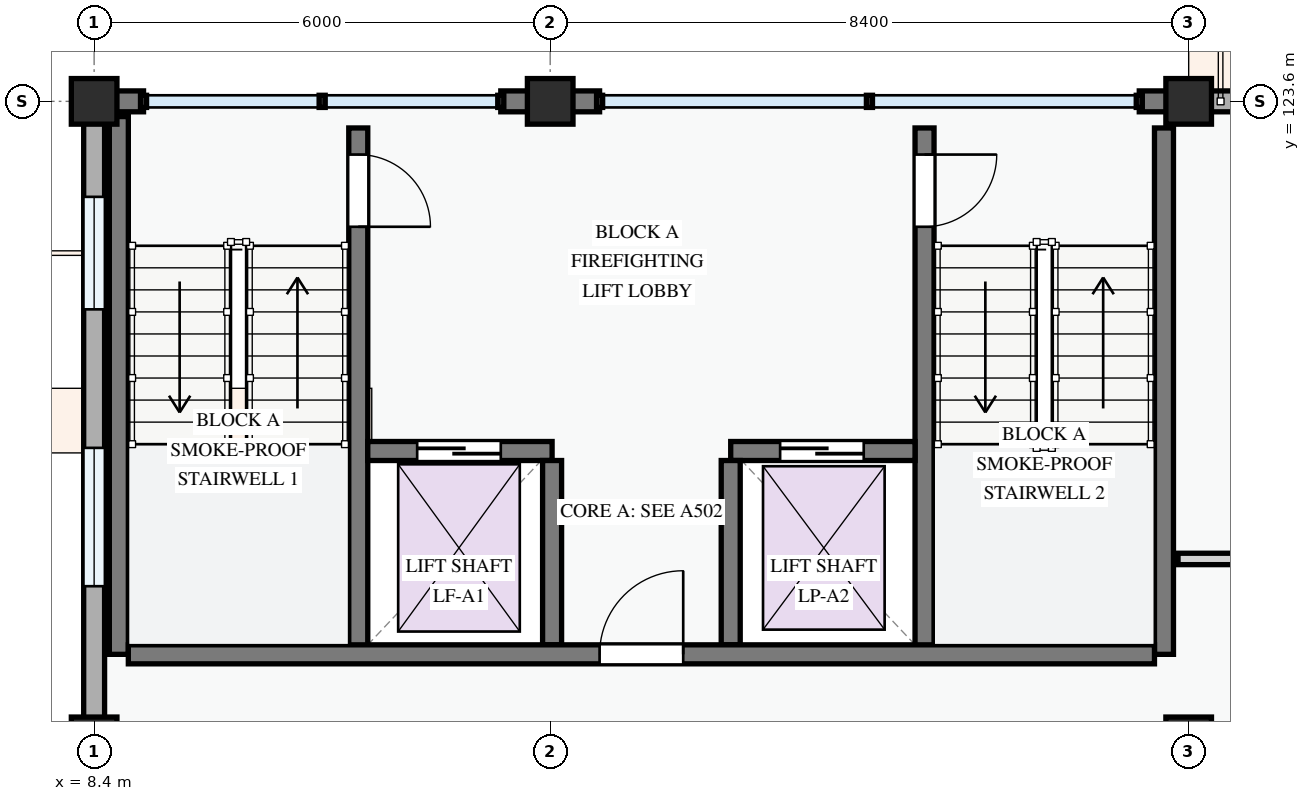
"""IFC4 building model, lengths in metres.
Left out: names, types, materials, properties, quantities, classifications, styles, units other than length and angle.
Written with IfcOpenShell. Run it as: python <this file> out.ifc"""

import sys

from ifc_helpers import new_model, si_unit, direction, frame, frame_2d, origin, origin_2d, place, context, subcontext, project, spatial, rectangle, extrude, element, fill, save


model = new_model("IFC4")
c1 = context("Model", 3, precision=1e-05, world=origin(), true_north=direction((0.0, 1.0)))
c2 = subcontext(c1, "Body", "Model", "MODEL_VIEW")
j1 = project(units=[si_unit("LENGTHUNIT", "METRE"), si_unit("PLANEANGLEUNIT", "RADIAN")], contexts=[c1])
p1 = place(None, origin())
s1 = spatial("IfcSite", under=j1, at=p1, CompositionType="ELEMENT")
p2 = place(p1, origin())
s2 = spatial("IfcBuilding", under=s1, at=p2, CompositionType="ELEMENT")
p3 = place(p2, frame((0.0, 0.0, 31.2)))
s3 = spatial("IfcBuildingStorey", under=s2, at=p3, CompositionType="ELEMENT", Elevation=31.2)
for number, where, z_axis, x_axis in (
    (1, (8.4, 115.2, 0.0), (0.0, 0.0, 1.0), (1.0, 0.0, 0.0)),
    (2, (8.4, 123.6, 0.0), (0.0, 0.0, 1.0), (1.0, 0.0, 0.0)),
    (3, (14.4, 123.6, 0.0), (0.0, 0.0, 1.0), (1.0, 0.0, 0.0)),
    (4, (22.8, 115.2, 0.0), (0.0, 0.0, 1.0), (1.0, 0.0, 0.0)),
    (5, (22.8, 123.6, 0.0), (0.0, 0.0, 1.0), (1.0, 0.0, 0.0)),
):
    element("IfcColumn", number, at=place(p3, frame(where, z_axis=z_axis, x_axis=x_axis)), inside=s3, PredefinedType="COLUMN", context=c2, shape_type="SweptSolid", body=[
        extrude(rectangle(XDim=0.6, YDim=0.6, at=origin_2d()), origin(), (0.0, 0.0, 1.0), 3.3),
    ])
p4 = place(p3, frame((28.8, 123.6, 0.0), z_axis=(0.0, 0.0, 1.0), x_axis=(-1.0, 0.0, 0.0)))
e6 = element("IfcWall", 6, at=p4, inside=s3, PredefinedType="STANDARD", context=c2, shape_type="SweptSolid", body=[
    extrude(rectangle(XDim=6.0, YDim=0.275, at=frame_2d((3.0, 0.0))), origin(), (0.0, 0.0, 1.0), 2.525),
])
p5 = place(p4, frame((0.62, 0.0, 0.0)))
e7 = element("IfcOpeningElement", 7, at=p5, cuts=e6, PredefinedType="OPENING", context=c2, shape_type="SweptSolid", body=[
    extrude(rectangle(XDim=1.5, YDim=2.2, at=frame_2d((0.75, 1.1))), frame((0.0, 0.147, 0.0), z_axis=(0.0, -1.0, 0.0), x_axis=(1.0, 0.0, 0.0)), (0.0, 0.0, 1.0), 0.295),
])
p6 = place(p4, frame((3.415, 0.0, 0.78)))
e8 = element("IfcOpeningElement", 8, at=p6, cuts=e6, PredefinedType="OPENING", context=c2, shape_type="SweptSolid", body=[
    extrude(rectangle(XDim=1.15, YDim=1.25, at=frame_2d((0.575, 0.625))), frame((0.0, 0.147, 0.0), z_axis=(0.0, -1.0, 0.0), x_axis=(1.0, 0.0, 0.0)), (0.0, 0.0, 1.0), 0.295),
])
for number, where, z_axis, x_axis in (
    (9, (22.8, 123.6, 0.0), (0.0, 0.0, 1.0), (-1.0, 0.0, 0.0)),
    (10, (15.05, 123.6, 0.0), (0.0, 0.0, 1.0), (-1.0, 0.0, 0.0)),
):
    element("IfcWall", number, at=place(p3, frame(where, z_axis=z_axis, x_axis=x_axis)), inside=s3, PredefinedType="STANDARD", context=c2, shape_type="SweptSolid", body=[
        extrude(rectangle(XDim=0.65, YDim=0.275, at=frame_2d((0.325, 0.0))), origin(), (0.0, 0.0, 1.0), 3.04),
    ])
p7 = place(p3, frame((14.4, 123.6, 0.0), z_axis=(0.0, 0.0, 1.0), x_axis=(-1.0, 0.0, 0.0)))
e11 = element("IfcWall", 11, at=p7, inside=s3, PredefinedType="STANDARD", context=c2, shape_type="SweptSolid", body=[
    extrude(rectangle(XDim=0.65, YDim=0.275, at=frame_2d((0.325, 0.0))), origin(), (0.0, 0.0, 1.0), 3.04),
])
p8 = place(p3, frame((9.05, 123.6, 0.0), z_axis=(0.0, 0.0, 1.0), x_axis=(-1.0, 0.0, 0.0)))
e12 = element("IfcWall", 12, at=p8, inside=s3, PredefinedType="STANDARD", context=c2, shape_type="SweptSolid", body=[
    extrude(rectangle(XDim=0.51, YDim=0.275, at=frame_2d((0.255, 0.0))), origin(), (0.0, 0.0, 1.0), 3.04),
])
p9 = place(p3, frame((8.4, 123.6, 0.0), z_axis=(0.0, 0.0, 1.0), x_axis=(0.0, -1.0, 0.0)))
e13 = element("IfcWall", 13, at=p9, inside=s3, PredefinedType="STANDARD", context=c2, shape_type="SweptSolid", body=[
    extrude(rectangle(XDim=8.4, YDim=0.275, at=frame_2d((4.2, 0.0))), origin(), (0.0, 0.0, 1.0), 2.425),
])
p10 = place(p9, frame((1.256, 0.0, 0.78)))
e14 = element("IfcOpeningElement", 14, at=p10, cuts=e13, PredefinedType="OPENING", context=c2, shape_type="SweptSolid", body=[
    extrude(rectangle(XDim=1.48, YDim=1.52, at=frame_2d((0.74, 0.76))), frame((0.0, 0.147, 0.0), z_axis=(0.0, -1.0, 0.0), x_axis=(1.0, 0.0, 0.0)), (0.0, 0.0, 1.0), 0.295),
])
p11 = place(p9, frame((4.559, 0.0, 0.78)))
e15 = element("IfcOpeningElement", 15, at=p11, cuts=e13, PredefinedType="OPENING", context=c2, shape_type="SweptSolid", body=[
    extrude(rectangle(XDim=1.82, YDim=1.46, at=frame_2d((0.91, 0.73))), frame((0.0, 0.147, 0.0), z_axis=(0.0, -1.0, 0.0), x_axis=(1.0, 0.0, 0.0)), (0.0, 0.0, 1.0), 0.295),
])
p12 = place(p3, frame((11.875, 123.25, 0.0), z_axis=(0.0, 0.0, 1.0), x_axis=(0.0, -1.0, 0.0)))
e16 = element("IfcWall", 16, at=p12, inside=s3, PredefinedType="SHEAR", context=c2, shape_type="SweptSolid", body=[
    extrude(rectangle(XDim=6.925, YDim=0.25, at=frame_2d((3.462, 0.0))), origin(), (0.0, 0.0, 1.0), 3.0),
])
p13 = place(p12, frame((0.35, 0.0, 0.0)))
e17 = element("IfcOpeningElement", 17, at=p13, cuts=e16, PredefinedType="OPENING", context=c2, shape_type="SweptSolid", body=[
    extrude(rectangle(XDim=0.95, YDim=2.1, at=frame_2d((0.475, 1.05))), frame((0.0, 0.135, 0.0), z_axis=(0.0, -1.0, 0.0), x_axis=(1.0, 0.0, 0.0)), (0.0, 0.0, 1.0), 0.27),
])
p14 = place(p3, frame((8.725, 123.4, 0.0), z_axis=(0.0, 0.0, 1.0), x_axis=(0.0, -1.0, 0.0)))
e18 = element("IfcWall", 18, at=p14, inside=s3, PredefinedType="SHEAR", context=c2, shape_type="SweptSolid", body=[
    extrude(rectangle(XDim=7.075, YDim=0.25, at=frame_2d((3.538, 0.0))), origin(), (0.0, 0.0, 1.0), 3.0),
])
p15 = place(p3, frame((22.475, 123.25, 0.0), z_axis=(0.0, 0.0, 1.0), x_axis=(0.0, -1.0, 0.0)))
e19 = element("IfcWall", 19, at=p15, inside=s3, PredefinedType="SHEAR", context=c2, shape_type="SweptSolid", body=[
    extrude(rectangle(XDim=6.925, YDim=0.25, at=frame_2d((3.462, 0.0))), origin(), (0.0, 0.0, 1.0), 3.0),
])
p16 = place(p3, frame((19.325, 123.25, 0.0), z_axis=(0.0, 0.0, 1.0), x_axis=(0.0, -1.0, 0.0)))
e20 = element("IfcWall", 20, at=p16, inside=s3, PredefinedType="SHEAR", context=c2, shape_type="SweptSolid", body=[
    extrude(rectangle(XDim=6.925, YDim=0.25, at=frame_2d((3.462, 0.0))), origin(), (0.0, 0.0, 1.0), 3.0),
])
p17 = place(p16, frame((0.35, 0.0, 0.0)))
e21 = element("IfcOpeningElement", 21, at=p17, cuts=e20, PredefinedType="OPENING", context=c2, shape_type="SweptSolid", body=[
    extrude(rectangle(XDim=0.95, YDim=2.1, at=frame_2d((0.475, 1.05))), frame((0.0, 0.135, 0.0), z_axis=(0.0, -1.0, 0.0), x_axis=(1.0, 0.0, 0.0)), (0.0, 0.0, 1.0), 0.27),
])
p18 = place(p3, frame((12.0, 119.0, 0.0), z_axis=(0.0, 0.0, 1.0), x_axis=(1.0, 0.0, 0.0)))
e22 = element("IfcWall", 22, at=p18, inside=s3, PredefinedType="SHEAR", context=c2, shape_type="SweptSolid", body=[
    extrude(rectangle(XDim=2.425, YDim=0.25, at=frame_2d((1.212, 0.0))), origin(), (0.0, 0.0, 1.0), 3.0),
])
p19 = place(p18, frame((0.65, 0.0, 0.0)))
e23 = element("IfcOpeningElement", 23, at=p19, cuts=e22, PredefinedType="OPENING", context=c2, shape_type="SweptSolid", body=[
    extrude(rectangle(XDim=1.1, YDim=2.15, at=frame_2d((0.55, 1.075))), frame((0.0, 0.135, 0.0), z_axis=(0.0, -1.0, 0.0), x_axis=(1.0, 0.0, 0.0)), (0.0, 0.0, 1.0), 0.27),
])
p20 = place(p3, frame((16.775, 119.0, 0.0), z_axis=(0.0, 0.0, 1.0), x_axis=(1.0, 0.0, 0.0)))
e24 = element("IfcWall", 24, at=p20, inside=s3, PredefinedType="SHEAR", context=c2, shape_type="SweptSolid", body=[
    extrude(rectangle(XDim=2.425, YDim=0.25, at=frame_2d((1.212, 0.0))), origin(), (0.0, 0.0, 1.0), 3.0),
])
p21 = place(p20, frame((0.65, 0.0, 0.0)))
e25 = element("IfcOpeningElement", 25, at=p21, cuts=e24, PredefinedType="OPENING", context=c2, shape_type="SweptSolid", body=[
    extrude(rectangle(XDim=1.1, YDim=2.15, at=frame_2d((0.55, 1.075))), frame((0.0, 0.135, 0.0), z_axis=(0.0, -1.0, 0.0), x_axis=(1.0, 0.0, 0.0)), (0.0, 0.0, 1.0), 0.27),
])
for number, where, z_axis, x_axis in (
    (26, (14.425, 118.875, 0.0), (0.0, 0.0, 1.0), (0.0, -1.0, 0.0)),
    (27, (16.775, 118.875, 0.0), (0.0, 0.0, 1.0), (0.0, -1.0, 0.0)),
):
    element("IfcWall", number, at=place(p3, frame(where, z_axis=z_axis, x_axis=x_axis)), inside=s3, PredefinedType="SHEAR", context=c2, shape_type="SweptSolid", body=[
        extrude(rectangle(XDim=2.425, YDim=0.25, at=frame_2d((1.212, 0.0))), origin(), (0.0, 0.0, 1.0), 3.0),
    ])
p22 = place(p3, frame((8.85, 116.325, 0.0), z_axis=(0.0, 0.0, 1.0), x_axis=(1.0, 0.0, 0.0)))
e28 = element("IfcWall", 28, at=p22, inside=s3, PredefinedType="SHEAR", context=c2, shape_type="SweptSolid", body=[
    extrude(rectangle(XDim=13.5, YDim=0.25, at=frame_2d((6.75, 0.0))), origin(), (0.0, 0.0, 1.0), 3.0),
])
p23 = place(p22, frame((6.2, 0.0, 0.0)))
e29 = element("IfcOpeningElement", 29, at=p23, cuts=e28, PredefinedType="OPENING", context=c2, shape_type="SweptSolid", body=[
    extrude(rectangle(XDim=1.1, YDim=2.15, at=frame_2d((0.55, 1.075))), frame((0.0, 0.135, 0.0), z_axis=(0.0, -1.0, 0.0), x_axis=(1.0, 0.0, 0.0)), (0.0, 0.0, 1.0), 0.27),
])
p24 = place(p3, frame((22.66, 117.58, 0.0), z_axis=(0.0, 0.0, 1.0), x_axis=(1.0, 0.0, 0.0)))
e30 = element("IfcWall", 30, at=p24, inside=s3, PredefinedType="PARTITIONING", context=c2, shape_type="SweptSolid", body=[
    extrude(rectangle(XDim=28.88, YDim=0.15, at=frame_2d((14.44, 0.0))), origin(), (0.0, 0.0, 1.0), 3.0),
])
p25 = place(p24, frame((2.74, 0.0, 0.0)))
e31 = element("IfcOpeningElement", 31, at=p25, cuts=e30, PredefinedType="OPENING", context=c2, shape_type="SweptSolid", body=[
    extrude(rectangle(XDim=0.92, YDim=2.1, at=frame_2d((0.46, 1.05))), frame((0.0, 0.085, 0.0), z_axis=(0.0, -1.0, 0.0), x_axis=(1.0, 0.0, 0.0)), (0.0, 0.0, 1.0), 0.17),
])
p26 = place(p24, frame((11.71, 0.0, 0.0)))
e32 = element("IfcOpeningElement", 32, at=p26, cuts=e30, PredefinedType="OPENING", context=c2, shape_type="SweptSolid", body=[
    extrude(rectangle(XDim=0.92, YDim=2.1, at=frame_2d((0.46, 1.05))), frame((0.0, 0.085, 0.0), z_axis=(0.0, -1.0, 0.0), x_axis=(1.0, 0.0, 0.0)), (0.0, 0.0, 1.0), 0.17),
])
p27 = place(p24, frame((22.397, 0.0, 0.0)))
e33 = element("IfcOpeningElement", 33, at=p27, cuts=e30, PredefinedType="OPENING", context=c2, shape_type="SweptSolid", body=[
    extrude(rectangle(XDim=0.92, YDim=2.1, at=frame_2d((0.46, 1.05))), frame((0.0, 0.085, 0.0), z_axis=(0.0, -1.0, 0.0), x_axis=(1.0, 0.0, 0.0)), (0.0, 0.0, 1.0), 0.17),
])
p28 = place(p10, origin())
e34 = element("IfcWindow", 34, at=p28, inside=s3, PartitioningType="SINGLE_PANEL", PredefinedType="WINDOW", context=c2, shape_type="SweptSolid", body=[
    extrude(rectangle(XDim=1.48, YDim=1.52, at=frame_2d((0.74, 0.76))), frame((0.0, 0.03, 0.0), z_axis=(0.0, -1.0, 0.0), x_axis=(1.0, 0.0, 0.0)), (0.0, 0.0, 1.0), 0.06),
])
fill(e14, e34)
p29 = place(p11, origin())
e35 = element("IfcWindow", 35, at=p29, inside=s3, PartitioningType="DOUBLE_PANEL_VERTICAL", PredefinedType="WINDOW", context=c2, shape_type="SweptSolid", body=[
    extrude(rectangle(XDim=1.82, YDim=1.46, at=frame_2d((0.91, 0.73))), frame((0.0, 0.03, 0.0), z_axis=(0.0, -1.0, 0.0), x_axis=(1.0, 0.0, 0.0)), (0.0, 0.0, 1.0), 0.06),
])
fill(e15, e35)
p30 = place(p13, origin())
e36 = element("IfcDoor", 36, at=p30, inside=s3, OperationType="SINGLE_SWING_RIGHT", PredefinedType="DOOR", context=c2, shape_type="SweptSolid", body=[
    extrude(rectangle(XDim=0.95, YDim=2.1, at=frame_2d((0.475, 1.05))), frame((0.0, 0.025, 0.0), z_axis=(0.0, -1.0, 0.0), x_axis=(1.0, 0.0, 0.0)), (0.0, 0.0, 1.0), 0.05),
])
fill(e17, e36)
p31 = place(p17, origin())
e37 = element("IfcDoor", 37, at=p31, inside=s3, OperationType="SINGLE_SWING_LEFT", PredefinedType="DOOR", context=c2, shape_type="SweptSolid", body=[
    extrude(rectangle(XDim=0.95, YDim=2.1, at=frame_2d((0.475, 1.05))), frame((0.0, 0.025, 0.0), z_axis=(0.0, -1.0, 0.0), x_axis=(1.0, 0.0, 0.0)), (0.0, 0.0, 1.0), 0.05),
])
fill(e21, e37)
p32 = place(p19, origin())
e38 = element("IfcDoor", 38, at=p32, inside=s3, OperationType="SLIDING_TO_LEFT", PredefinedType="DOOR", context=c2, shape_type="SweptSolid", body=[
    extrude(rectangle(XDim=1.1, YDim=2.15, at=frame_2d((0.55, 1.075))), frame((0.0, 0.025, 0.0), z_axis=(0.0, -1.0, 0.0), x_axis=(1.0, 0.0, 0.0)), (0.0, 0.0, 1.0), 0.05),
])
fill(e23, e38)
p33 = place(p21, origin())
e39 = element("IfcDoor", 39, at=p33, inside=s3, OperationType="SLIDING_TO_LEFT", PredefinedType="DOOR", context=c2, shape_type="SweptSolid", body=[
    extrude(rectangle(XDim=1.1, YDim=2.15, at=frame_2d((0.55, 1.075))), frame((0.0, 0.025, 0.0), z_axis=(0.0, -1.0, 0.0), x_axis=(1.0, 0.0, 0.0)), (0.0, 0.0, 1.0), 0.05),
])
fill(e25, e39)
p34 = place(p23, origin())
e40 = element("IfcDoor", 40, at=p34, inside=s3, OperationType="SINGLE_SWING_RIGHT", PredefinedType="DOOR", context=c2, shape_type="SweptSolid", body=[
    extrude(rectangle(XDim=1.1, YDim=2.15, at=frame_2d((0.55, 1.075))), frame((0.0, 0.025, 0.0), z_axis=(0.0, -1.0, 0.0), x_axis=(1.0, 0.0, 0.0)), (0.0, 0.0, 1.0), 0.05),
])
fill(e29, e40)
save(model, sys.argv[1])
